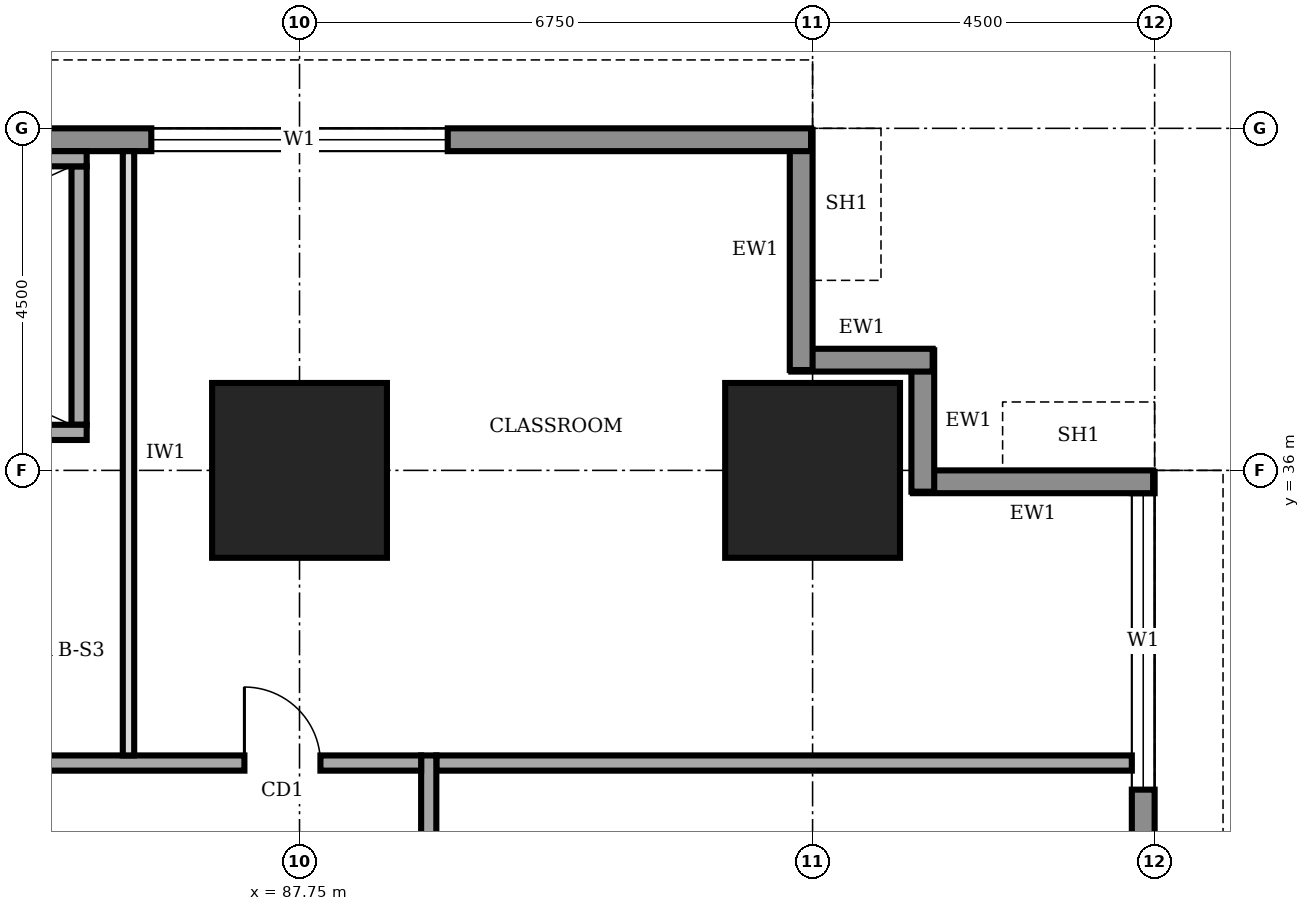
"""IFC4 building model, lengths in metres.
Left out: names, types, materials, properties, quantities, classifications, styles, units other than length and angle.
Written with IfcOpenShell. Run it as: python <this file> out.ifc"""

import sys

from ifc_helpers import new_model, si_unit, direction, frame, frame_2d, origin, origin_2d, place, context, subcontext, project, spatial, rectangle, extrude, element, fill, save


model = new_model("IFC4")
c1 = context("Model", 3, precision=1e-05, world=origin(), true_north=direction((0.0, 1.0)))
c2 = subcontext(c1, "Body", "Model", "MODEL_VIEW")
j1 = project(units=[si_unit("LENGTHUNIT", "METRE"), si_unit("PLANEANGLEUNIT", "RADIAN")], contexts=[c1])
p1 = place(None, origin())
s1 = spatial("IfcSite", under=j1, at=p1, CompositionType="ELEMENT")
p2 = place(p1, origin())
s2 = spatial("IfcBuilding", under=s1, at=p2, CompositionType="ELEMENT")
p3 = place(p2, frame((0.0, 0.0, 41.0)))
s3 = spatial("IfcBuildingStorey", under=s2, at=p3, CompositionType="ELEMENT", Elevation=41.0)
for number, where, z_axis, x_axis in (
    (1, (87.75, 36.0, 0.0), (0.0, 0.0, 1.0), (1.0, 0.0, 0.0)),
    (2, (94.5, 36.0, 0.0), (0.0, 0.0, 1.0), (1.0, 0.0, 0.0)),
):
    element("IfcColumn", number, at=place(p3, frame(where, z_axis=z_axis, x_axis=x_axis)), inside=s3, PredefinedType="COLUMN", context=c2, shape_type="SweptSolid", body=[
        extrude(rectangle(XDim=2.3, YDim=2.3, at=origin_2d()), origin(), (0.0, 0.0, 1.0), 4.0),
    ])
p4 = place(p3, frame((98.85, 4.52, 0.0), z_axis=(0.0, 0.0, 1.0), x_axis=(0.0, 1.0, 0.0)))
e3 = element("IfcWall", 3, at=p4, inside=s3, PredefinedType="STANDARD", context=c2, shape_type="SweptSolid", body=[
    extrude(rectangle(XDim=31.46, YDim=0.3, at=frame_2d((15.73, 0.0))), origin(), (0.0, 0.0, 1.0), 3.75),
])
p5 = place(p4, frame((4.78, 0.0, 0.9)))
e4 = element("IfcOpeningElement", 4, at=p5, cuts=e3, PredefinedType="OPENING", context=c2, shape_type="SweptSolid", body=[
    extrude(rectangle(XDim=3.9, YDim=2.2, at=frame_2d((1.95, 1.1))), frame((0.0, 0.16, 0.0), z_axis=(0.0, -1.0, 0.0), x_axis=(1.0, 0.0, 0.0)), (0.0, 0.0, 1.0), 0.32),
])
p6 = place(p4, frame((9.28, 0.0, 0.9)))
e5 = element("IfcOpeningElement", 5, at=p6, cuts=e3, PredefinedType="OPENING", context=c2, shape_type="SweptSolid", body=[
    extrude(rectangle(XDim=3.9, YDim=2.2, at=frame_2d((1.95, 1.1))), frame((0.0, 0.16, 0.0), z_axis=(0.0, -1.0, 0.0), x_axis=(1.0, 0.0, 0.0)), (0.0, 0.0, 1.0), 0.32),
])
p7 = place(p4, frame((13.78, 0.0, 0.9)))
e6 = element("IfcOpeningElement", 6, at=p7, cuts=e3, PredefinedType="OPENING", context=c2, shape_type="SweptSolid", body=[
    extrude(rectangle(XDim=3.9, YDim=2.2, at=frame_2d((1.95, 1.1))), frame((0.0, 0.16, 0.0), z_axis=(0.0, -1.0, 0.0), x_axis=(1.0, 0.0, 0.0)), (0.0, 0.0, 1.0), 0.32),
])
p8 = place(p4, frame((18.28, 0.0, 0.9)))
e7 = element("IfcOpeningElement", 7, at=p8, cuts=e3, PredefinedType="OPENING", context=c2, shape_type="SweptSolid", body=[
    extrude(rectangle(XDim=3.9, YDim=2.2, at=frame_2d((1.95, 1.1))), frame((0.0, 0.16, 0.0), z_axis=(0.0, -1.0, 0.0), x_axis=(1.0, 0.0, 0.0)), (0.0, 0.0, 1.0), 0.32),
])
p9 = place(p4, frame((22.78, 0.0, 0.9)))
e8 = element("IfcOpeningElement", 8, at=p9, cuts=e3, PredefinedType="OPENING", context=c2, shape_type="SweptSolid", body=[
    extrude(rectangle(XDim=3.9, YDim=2.2, at=frame_2d((1.95, 1.1))), frame((0.0, 0.16, 0.0), z_axis=(0.0, -1.0, 0.0), x_axis=(1.0, 0.0, 0.0)), (0.0, 0.0, 1.0), 0.32),
])
p10 = place(p4, frame((27.28, 0.0, 0.9)))
e9 = element("IfcOpeningElement", 9, at=p10, cuts=e3, PredefinedType="OPENING", context=c2, shape_type="SweptSolid", body=[
    extrude(rectangle(XDim=3.9, YDim=2.2, at=frame_2d((1.95, 1.1))), frame((0.0, 0.16, 0.0), z_axis=(0.0, -1.0, 0.0), x_axis=(1.0, 0.0, 0.0)), (0.0, 0.0, 1.0), 0.32),
])
p11 = place(p3, frame((98.98, 35.85, 0.0), z_axis=(0.0, 0.0, 1.0), x_axis=(-1.0, 0.0, 0.0)))
e10 = element("IfcWall", 10, at=p11, inside=s3, PredefinedType="STANDARD", context=c2, shape_type="SweptSolid", body=[
    extrude(rectangle(XDim=3.16, YDim=0.3, at=frame_2d((1.58, 0.0))), origin(), (0.0, 0.0, 1.0), 2.85),
])
for number, where, z_axis, x_axis in (
    (11, (95.95, 35.72, 0.0), (0.0, 0.0, 1.0), (0.0, 1.0, 0.0)),
    (12, (96.08, 37.45, 0.0), (0.0, 0.0, 1.0), (-1.0, 0.0, 0.0)),
):
    element("IfcWall", number, at=place(p3, frame(where, z_axis=z_axis, x_axis=x_axis)), inside=s3, PredefinedType="STANDARD", context=c2, shape_type="SweptSolid", body=[
        extrude(rectangle(XDim=1.86, YDim=0.3, at=frame_2d((0.93, 0.0))), origin(), (0.0, 0.0, 1.0), 3.75),
    ])
p12 = place(p3, frame((94.35, 37.32, 0.0), z_axis=(0.0, 0.0, 1.0), x_axis=(0.0, 1.0, 0.0)))
e13 = element("IfcWall", 13, at=p12, inside=s3, PredefinedType="STANDARD", context=c2, shape_type="SweptSolid", body=[
    extrude(rectangle(XDim=3.16, YDim=0.3, at=frame_2d((1.58, 0.0))), origin(), (0.0, 0.0, 1.0), 2.85),
])
p13 = place(p3, frame((94.48, 40.35, 0.0), z_axis=(0.0, 0.0, 1.0), x_axis=(-1.0, 0.0, 0.0)))
e14 = element("IfcWall", 14, at=p13, inside=s3, PredefinedType="STANDARD", context=c2, shape_type="SweptSolid", body=[
    extrude(rectangle(XDim=26.96, YDim=0.3, at=frame_2d((13.48, 0.0))), origin(), (0.0, 0.0, 1.0), 3.75),
])
p14 = place(p13, frame((22.78, 0.0, 0.9)))
e15 = element("IfcOpeningElement", 15, at=p14, cuts=e14, PredefinedType="OPENING", context=c2, shape_type="SweptSolid", body=[
    extrude(rectangle(XDim=3.9, YDim=2.2, at=frame_2d((1.95, 1.1))), frame((0.0, 0.16, 0.0), z_axis=(0.0, -1.0, 0.0), x_axis=(1.0, 0.0, 0.0)), (0.0, 0.0, 1.0), 0.32),
])
p15 = place(p13, frame((18.28, 0.0, 0.9)))
e16 = element("IfcOpeningElement", 16, at=p15, cuts=e14, PredefinedType="OPENING", context=c2, shape_type="SweptSolid", body=[
    extrude(rectangle(XDim=3.9, YDim=2.2, at=frame_2d((1.95, 1.1))), frame((0.0, 0.16, 0.0), z_axis=(0.0, -1.0, 0.0), x_axis=(1.0, 0.0, 0.0)), (0.0, 0.0, 1.0), 0.32),
])
p16 = place(p13, frame((4.78, 0.0, 0.9)))
e17 = element("IfcOpeningElement", 17, at=p16, cuts=e14, PredefinedType="OPENING", context=c2, shape_type="SweptSolid", body=[
    extrude(rectangle(XDim=3.9, YDim=2.2, at=frame_2d((1.95, 1.1))), frame((0.0, 0.16, 0.0), z_axis=(0.0, -1.0, 0.0), x_axis=(1.0, 0.0, 0.0)), (0.0, 0.0, 1.0), 0.32),
])
p17 = place(p3, frame((89.45, 8.45, 0.0), z_axis=(0.0, 0.0, 1.0), x_axis=(0.0, 1.0, 0.0)))
e18 = element("IfcWall", 18, at=p17, inside=s3, PredefinedType="SOLIDWALL", context=c2, shape_type="SweptSolid", body=[
    extrude(rectangle(XDim=23.8, YDim=0.2, at=frame_2d((11.9, 0.0))), origin(), (0.0, 0.0, 1.0), 3.75),
])
p18 = place(p17, frame((1.925, 0.0, 0.0)))
e19 = element("IfcOpeningElement", 19, at=p18, cuts=e18, PredefinedType="OPENING", context=c2, shape_type="SweptSolid", body=[
    extrude(rectangle(XDim=1.0, YDim=2.1, at=frame_2d((0.5, 1.05))), frame((0.0, 0.11, 0.0), z_axis=(0.0, -1.0, 0.0), x_axis=(1.0, 0.0, 0.0)), (0.0, 0.0, 1.0), 0.22),
])
p19 = place(p17, frame((6.3, 0.0, 0.0)))
e20 = element("IfcOpeningElement", 20, at=p19, cuts=e18, PredefinedType="OPENING", context=c2, shape_type="SweptSolid", body=[
    extrude(rectangle(XDim=0.9, YDim=2.1, at=frame_2d((0.45, 1.05))), frame((0.0, 0.11, 0.0), z_axis=(0.0, -1.0, 0.0), x_axis=(1.0, 0.0, 0.0)), (0.0, 0.0, 1.0), 0.22),
])
p20 = place(p17, frame((11.1, 0.0, 0.0)))
e21 = element("IfcOpeningElement", 21, at=p20, cuts=e18, PredefinedType="OPENING", context=c2, shape_type="SweptSolid", body=[
    extrude(rectangle(XDim=0.9, YDim=2.1, at=frame_2d((0.45, 1.05))), frame((0.0, 0.11, 0.0), z_axis=(0.0, -1.0, 0.0), x_axis=(1.0, 0.0, 0.0)), (0.0, 0.0, 1.0), 0.22),
])
p21 = place(p17, frame((14.15, 0.0, 0.0)))
e22 = element("IfcOpeningElement", 22, at=p21, cuts=e18, PredefinedType="OPENING", context=c2, shape_type="SweptSolid", body=[
    extrude(rectangle(XDim=0.9, YDim=2.1, at=frame_2d((0.45, 1.05))), frame((0.0, 0.11, 0.0), z_axis=(0.0, -1.0, 0.0), x_axis=(1.0, 0.0, 0.0)), (0.0, 0.0, 1.0), 0.22),
])
p22 = place(p17, frame((17.05, 0.0, 0.0)))
e23 = element("IfcOpeningElement", 23, at=p22, cuts=e18, PredefinedType="OPENING", context=c2, shape_type="SweptSolid", body=[
    extrude(rectangle(XDim=1.0, YDim=2.1, at=frame_2d((0.5, 1.05))), frame((0.0, 0.11, 0.0), z_axis=(0.0, -1.0, 0.0), x_axis=(1.0, 0.0, 0.0)), (0.0, 0.0, 1.0), 0.22),
])
p23 = place(p17, frame((8.95, 0.0, 0.0)))
e24 = element("IfcOpeningElement", 24, at=p23, cuts=e18, PredefinedType="OPENING", context=c2, shape_type="SweptSolid", body=[
    extrude(rectangle(XDim=1.0, YDim=2.1, at=frame_2d((0.5, 1.05))), frame((0.0, 0.11, 0.0), z_axis=(0.0, -1.0, 0.0), x_axis=(1.0, 0.0, 0.0)), (0.0, 0.0, 1.0), 0.22),
])
p24 = place(p17, frame((20.675, 0.0, 0.0)))
e25 = element("IfcOpeningElement", 25, at=p24, cuts=e18, PredefinedType="OPENING", context=c2, shape_type="SweptSolid", body=[
    extrude(rectangle(XDim=1.0, YDim=2.1, at=frame_2d((0.5, 1.05))), frame((0.0, 0.11, 0.0), z_axis=(0.0, -1.0, 0.0), x_axis=(1.0, 0.0, 0.0)), (0.0, 0.0, 1.0), 0.22),
])
p25 = place(p3, frame((89.35, 32.15, 0.0), z_axis=(0.0, 0.0, 1.0), x_axis=(-1.0, 0.0, 0.0)))
e26 = element("IfcWall", 26, at=p25, inside=s3, PredefinedType="SOLIDWALL", context=c2, shape_type="SweptSolid", body=[
    extrude(rectangle(XDim=16.9, YDim=0.2, at=frame_2d((8.45, 0.0))), origin(), (0.0, 0.0, 1.0), 3.75),
])
p26 = place(p25, frame((14.375, 0.0, 0.0)))
e27 = element("IfcOpeningElement", 27, at=p26, cuts=e26, PredefinedType="OPENING", context=c2, shape_type="SweptSolid", body=[
    extrude(rectangle(XDim=1.0, YDim=2.1, at=frame_2d((0.5, 1.05))), frame((0.0, 0.11, 0.0), z_axis=(0.0, -1.0, 0.0), x_axis=(1.0, 0.0, 0.0)), (0.0, 0.0, 1.0), 0.22),
])
p27 = place(p25, frame((7.85, 0.0, 0.0)))
e28 = element("IfcOpeningElement", 28, at=p27, cuts=e26, PredefinedType="OPENING", context=c2, shape_type="SweptSolid", body=[
    extrude(rectangle(XDim=1.0, YDim=2.1, at=frame_2d((0.5, 1.05))), frame((0.0, 0.11, 0.0), z_axis=(0.0, -1.0, 0.0), x_axis=(1.0, 0.0, 0.0)), (0.0, 0.0, 1.0), 0.22),
])
p28 = place(p25, frame((1.325, 0.0, 0.0)))
e29 = element("IfcOpeningElement", 29, at=p28, cuts=e26, PredefinedType="OPENING", context=c2, shape_type="SweptSolid", body=[
    extrude(rectangle(XDim=1.0, YDim=2.1, at=frame_2d((0.5, 1.05))), frame((0.0, 0.11, 0.0), z_axis=(0.0, -1.0, 0.0), x_axis=(1.0, 0.0, 0.0)), (0.0, 0.0, 1.0), 0.22),
])
p29 = place(p3, frame((89.55, 32.15, 0.0), z_axis=(0.0, 0.0, 1.0), x_axis=(1.0, 0.0, 0.0)))
e30 = element("IfcWall", 30, at=p29, inside=s3, PredefinedType="SOLIDWALL", context=c2, shape_type="SweptSolid", body=[
    extrude(rectangle(XDim=9.15, YDim=0.2, at=frame_2d((4.575, 0.0))), origin(), (0.0, 0.0, 1.0), 3.75),
])
p30 = place(p3, frame((85.5, 32.25, 0.0), z_axis=(0.0, 0.0, 1.0), x_axis=(0.0, 1.0, 0.0)))
e31 = element("IfcWall", 31, at=p30, inside=s3, PredefinedType="PARTITIONING", context=c2, shape_type="SweptSolid", body=[
    extrude(rectangle(XDim=7.95, YDim=0.15, at=frame_2d((3.975, 0.0))), origin(), (0.0, 0.0, 1.0), 3.75),
])
p31 = place(p3, frame((77.05, 36.5, 0.0), z_axis=(0.0, 0.0, 1.0), x_axis=(1.0, 0.0, 0.0)))
e32 = element("IfcWall", 32, at=p31, inside=s3, PredefinedType="SOLIDWALL", context=c2, shape_type="SweptSolid", body=[
    extrude(rectangle(XDim=7.9, YDim=0.2, at=frame_2d((3.95, 0.0))), origin(), (0.0, 0.0, 1.0), 3.75),
])
p32 = place(p31, frame((6.3, 0.0, 0.0)))
e33 = element("IfcOpeningElement", 33, at=p32, cuts=e32, PredefinedType="OPENING", context=c2, shape_type="SweptSolid", body=[
    extrude(rectangle(XDim=1.0, YDim=2.1, at=frame_2d((0.5, 1.05))), frame((0.0, 0.11, 0.0), z_axis=(0.0, -1.0, 0.0), x_axis=(1.0, 0.0, 0.0)), (0.0, 0.0, 1.0), 0.22),
])
p33 = place(p3, frame((77.05, 40.1, 0.0), z_axis=(0.0, 0.0, 1.0), x_axis=(1.0, 0.0, 0.0)))
e34 = element("IfcWall", 34, at=p33, inside=s3, PredefinedType="SOLIDWALL", context=c2, shape_type="SweptSolid", body=[
    extrude(rectangle(XDim=7.9, YDim=0.2, at=frame_2d((3.95, 0.0))), origin(), (0.0, 0.0, 1.0), 3.75),
])
p34 = place(p3, frame((84.85, 36.6, 0.0), z_axis=(0.0, 0.0, 1.0), x_axis=(0.0, 1.0, 0.0)))
e35 = element("IfcWall", 35, at=p34, inside=s3, PredefinedType="SOLIDWALL", context=c2, shape_type="SweptSolid", body=[
    extrude(rectangle(XDim=3.4, YDim=0.2, at=frame_2d((1.7, 0.0))), origin(), (0.0, 0.0, 1.0), 3.75),
])
p35 = place(p10, origin())
e36 = element("IfcWindow", 36, at=p35, inside=s3, PartitioningType="SINGLE_PANEL", PredefinedType="WINDOW", context=c2, shape_type="SweptSolid", body=[
    extrude(rectangle(XDim=3.9, YDim=2.2, at=frame_2d((1.95, 1.1))), frame((0.0, 0.03, 0.0), z_axis=(0.0, -1.0, 0.0), x_axis=(1.0, 0.0, 0.0)), (0.0, 0.0, 1.0), 0.06),
])
fill(e9, e36)
p36 = place(p16, origin())
e37 = element("IfcWindow", 37, at=p36, inside=s3, PartitioningType="SINGLE_PANEL", PredefinedType="WINDOW", context=c2, shape_type="SweptSolid", body=[
    extrude(rectangle(XDim=3.9, YDim=2.2, at=frame_2d((1.95, 1.1))), frame((0.0, 0.03, 0.0), z_axis=(0.0, -1.0, 0.0), x_axis=(1.0, 0.0, 0.0)), (0.0, 0.0, 1.0), 0.06),
])
fill(e17, e37)
p37 = place(p28, frame((1.0, 0.0, 0.0), z_axis=(0.0, 0.0, 1.0), x_axis=(-1.0, 0.0, 0.0)))
e38 = element("IfcDoor", 38, at=p37, inside=s3, OperationType="SINGLE_SWING_LEFT", PredefinedType="DOOR", context=c2, shape_type="SweptSolid", body=[
    extrude(rectangle(XDim=1.0, YDim=2.1, at=frame_2d((0.5, 1.05))), frame((0.0, 0.025, 0.0), z_axis=(0.0, -1.0, 0.0), x_axis=(1.0, 0.0, 0.0)), (0.0, 0.0, 1.0), 0.05),
])
fill(e29, e38)
save(model, sys.argv[1])
